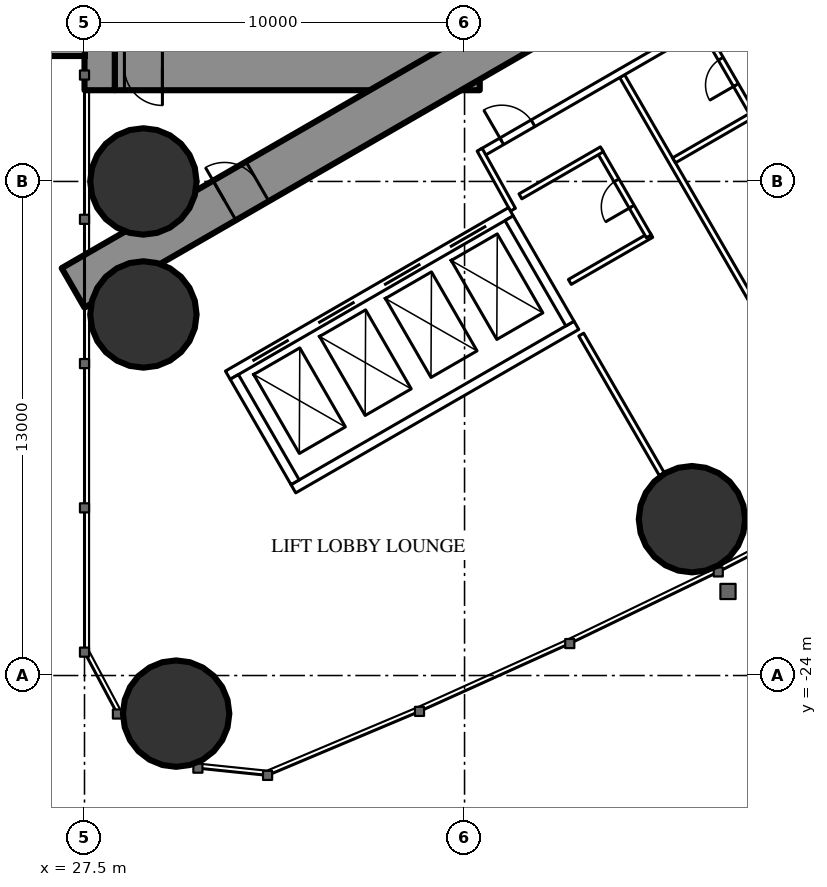
"""IFC4 building model, lengths in metres.
Left out: names, types, materials, properties, quantities, classifications, styles, units other than length and angle.
Written with IfcOpenShell. Run it as: python <this file> out.ifc"""

import sys

from ifc_helpers import new_model, si_unit, direction, frame, frame_2d, origin, origin_2d, place, context, subcontext, project, spatial, rectangle, hollow_circle, extrude, element, fill, save


model = new_model("IFC4")
c1 = context("Model", 3, precision=1e-05, world=origin(), true_north=direction((0.0, 1.0)))
c2 = subcontext(c1, "Body", "Model", "MODEL_VIEW")
j1 = project(units=[si_unit("LENGTHUNIT", "METRE"), si_unit("PLANEANGLEUNIT", "RADIAN")], contexts=[c1])
p1 = place(None, origin())
s1 = spatial("IfcSite", under=j1, at=p1, CompositionType="ELEMENT")
p2 = place(p1, origin())
s2 = spatial("IfcBuilding", under=s1, at=p2, CompositionType="ELEMENT")
p3 = place(p2, frame((0.0, 0.0, 49.5)))
s3 = spatial("IfcBuildingStorey", under=s2, at=p3, CompositionType="ELEMENT", Elevation=49.5)
for number, where, z_axis, x_axis in (
    (1, (29.911, -25.002, 0.0), (0.0, 0.0, 1.0), (1.0, 0.0, 0.0)),
    (2, (29.05, -11.0, 0.0), (0.0, 0.0, 1.0), (1.0, 0.0, 0.0)),
    (3, (29.05, -14.5, 0.0), (0.0, 0.0, 1.0), (1.0, 0.0, 0.0)),
    (4, (43.484, -19.886, 0.0), (0.0, 0.0, 1.0), (1.0, 0.0, 0.0)),
):
    element("IfcColumn", number, at=place(p3, frame(where, z_axis=z_axis, x_axis=x_axis)), inside=s3, PredefinedType="COLUMN", context=c2, shape_type="SweptSolid", body=[
        extrude(hollow_circle(Radius=1.4, WallThickness=0.12, at=origin_2d()), origin(), (0.0, 0.0, 1.0), 3.5),
    ])
p4 = place(p3, frame((27.9, -8.6, 0.0), z_axis=(0.0, 0.0, 1.0), x_axis=(0.0, 1.0, 0.0)))
e5 = element("IfcWall", 5, at=p4, inside=s3, PredefinedType="SHEAR", context=c2, shape_type="SweptSolid", body=[
    extrude(rectangle(XDim=17.2, YDim=0.8, at=frame_2d((8.6, 0.0))), origin(), (0.0, 0.0, 1.0), 3.5),
])
p5 = place(p4, frame((2.45, 0.0, 0.6)))
e6 = element("IfcOpeningElement", 6, at=p5, cuts=e5, PredefinedType="OPENING", context=c2, shape_type="SweptSolid", body=[
    extrude(rectangle(XDim=0.6, YDim=2.1, at=frame_2d((0.3, 1.05))), frame((0.0, 0.41, 0.0), z_axis=(0.0, -1.0, 0.0), x_axis=(1.0, 0.0, 0.0)), (0.0, 0.0, 1.0), 0.82),
])
p6 = place(p4, frame((14.15, 0.0, 0.6)))
e7 = element("IfcOpeningElement", 7, at=p6, cuts=e5, PredefinedType="OPENING", context=c2, shape_type="SweptSolid", body=[
    extrude(rectangle(XDim=0.6, YDim=2.1, at=frame_2d((0.3, 1.05))), frame((0.0, 0.41, 0.0), z_axis=(0.0, -1.0, 0.0), x_axis=(1.0, 0.0, 0.0)), (0.0, 0.0, 1.0), 0.82),
])
p7 = place(p3, frame((37.3, -8.6, 0.0), z_axis=(0.0, 0.0, 1.0), x_axis=(0.0, 1.0, 0.0)))
e8 = element("IfcWall", 8, at=p7, inside=s3, PredefinedType="SHEAR", context=c2, shape_type="SweptSolid", body=[
    extrude(rectangle(XDim=17.2, YDim=1.2, at=frame_2d((8.6, 0.0))), origin(), (0.0, 0.0, 1.0), 3.5),
])
p8 = place(p7, frame((7.7, 0.0, 0.0)))
e9 = element("IfcOpeningElement", 9, at=p8, cuts=e8, PredefinedType="OPENING", context=c2, shape_type="SweptSolid", body=[
    extrude(rectangle(XDim=1.8, YDim=2.2, at=frame_2d((0.9, 1.1))), frame((0.0, 0.61, 0.0), z_axis=(0.0, -1.0, 0.0), x_axis=(1.0, 0.0, 0.0)), (0.0, 0.0, 1.0), 1.22),
])
p9 = place(p3, frame((28.3, -8.0, 0.0), z_axis=(0.0, 0.0, 1.0), x_axis=(1.0, 0.0, 0.0)))
e10 = element("IfcWall", 10, at=p9, inside=s3, PredefinedType="SHEAR", context=c2, shape_type="SweptSolid", body=[
    extrude(rectangle(XDim=8.4, YDim=1.2, at=frame_2d((4.2, 0.0))), origin(), (0.0, 0.0, 1.0), 3.5),
])
p10 = place(p9, frame((0.25, 0.0, 0.0)))
e11 = element("IfcOpeningElement", 11, at=p10, cuts=e10, PredefinedType="OPENING", context=c2, shape_type="SweptSolid", body=[
    extrude(rectangle(XDim=1.0, YDim=2.2, at=frame_2d((0.5, 1.1))), frame((0.0, 0.61, 0.0), z_axis=(0.0, -1.0, 0.0), x_axis=(1.0, 0.0, 0.0)), (0.0, 0.0, 1.0), 1.22),
])
p11 = place(p3, frame((27.2, -13.8, 0.0), z_axis=(0.0, 0.0, 1.0), x_axis=(0.866027159892, 0.499996958321, 0.0)))
e12 = element("IfcWall", 12, at=p11, inside=s3, PredefinedType="SHEAR", context=c2, shape_type="SweptSolid", body=[
    extrude(rectangle(XDim=27.947, YDim=1.2, at=frame_2d((13.973, 0.0))), origin(), (0.0, 0.0, 1.0), 3.5),
])
p12 = place(p11, frame((4.6, 0.0, 0.0)))
e13 = element("IfcOpeningElement", 13, at=p12, cuts=e12, PredefinedType="OPENING", context=c2, shape_type="SweptSolid", body=[
    extrude(rectangle(XDim=1.0, YDim=2.2, at=frame_2d((0.5, 1.1))), frame((0.0, 0.61, 0.0), z_axis=(0.0, -1.0, 0.0), x_axis=(1.0, 0.0, 0.0)), (0.0, 0.0, 1.0), 1.22),
])
p13 = place(p11, frame((13.395, 0.0, 0.0)))
e14 = element("IfcOpeningElement", 14, at=p13, cuts=e12, PredefinedType="OPENING", context=c2, shape_type="SweptSolid", body=[
    extrude(rectangle(XDim=1.8, YDim=2.2, at=frame_2d((0.9, 1.1))), frame((0.0, 0.61, 0.0), z_axis=(0.0, -1.0, 0.0), x_axis=(1.0, 0.0, 0.0)), (0.0, 0.0, 1.0), 1.22),
])
p14 = place(p3, frame((41.647, -8.23, 0.0), z_axis=(0.0, 0.0, 1.0), x_axis=(0.49998590462, -0.866033541603, 0.0)))
e15 = element("IfcWall", 15, at=p14, inside=s3, PredefinedType="PARTITIONING", context=c2, shape_type="SweptSolid", body=[
    extrude(rectangle(XDim=12.621, YDim=0.15, at=frame_2d((6.311, 0.0))), origin(), (0.0, 0.0, 1.0), 3.25),
])
p15 = place(p3, frame((40.57, -15.03, 0.0), z_axis=(0.0, 0.0, 1.0), x_axis=(0.500012993597, -0.866017901798, 0.0)))
e16 = element("IfcWall", 16, at=p15, inside=s3, PredefinedType="PARTITIONING", context=c2, shape_type="SweptSolid", body=[
    extrude(rectangle(XDim=4.243, YDim=0.15, at=frame_2d((2.122, 0.0))), origin(), (0.0, 0.0, 1.0), 3.25),
])
p16 = place(p3, frame((37.96, -10.243, 0.0), z_axis=(0.0, 0.0, 1.0), x_axis=(0.866026429433, 0.499998223521, 0.0)))
e17 = element("IfcWall", 17, at=p16, inside=s3, PredefinedType="PARTITIONING", context=c2, shape_type="SweptSolid", body=[
    extrude(rectangle(XDim=20.487, YDim=0.2, at=frame_2d((10.243, 0.0))), origin(), (0.0, 0.0, 1.0), 3.25),
])
p17 = place(p16, frame((6.925, 0.0, 0.0)))
e18 = element("IfcOpeningElement", 18, at=p17, cuts=e17, PredefinedType="OPENING", context=c2, shape_type="SweptSolid", body=[
    extrude(rectangle(XDim=0.95, YDim=2.2, at=frame_2d((0.475, 1.1))), frame((0.0, 0.11, 0.0), z_axis=(0.0, -1.0, 0.0), x_axis=(1.0, 0.0, 0.0)), (0.0, 0.0, 1.0), 0.22),
])
p18 = place(p16, frame((11.549, 0.0, 0.0)))
e19 = element("IfcOpeningElement", 19, at=p18, cuts=e17, PredefinedType="OPENING", context=c2, shape_type="SweptSolid", body=[
    extrude(rectangle(XDim=0.95, YDim=2.2, at=frame_2d((0.475, 1.1))), frame((0.0, 0.11, 0.0), z_axis=(0.0, -1.0, 0.0), x_axis=(1.0, 0.0, 0.0)), (0.0, 0.0, 1.0), 0.22),
])
p19 = place(p16, frame((13.249, 0.0, 0.0)))
e20 = element("IfcOpeningElement", 20, at=p19, cuts=e17, PredefinedType="OPENING", context=c2, shape_type="SweptSolid", body=[
    extrude(rectangle(XDim=0.95, YDim=2.2, at=frame_2d((0.475, 1.1))), frame((0.0, 0.11, 0.0), z_axis=(0.0, -1.0, 0.0), x_axis=(1.0, 0.0, 0.0)), (0.0, 0.0, 1.0), 0.22),
])
p20 = place(p16, frame((17.585, 0.0, 0.0)))
e21 = element("IfcOpeningElement", 21, at=p20, cuts=e17, PredefinedType="OPENING", context=c2, shape_type="SweptSolid", body=[
    extrude(rectangle(XDim=0.95, YDim=2.2, at=frame_2d((0.475, 1.1))), frame((0.0, 0.11, 0.0), z_axis=(0.0, -1.0, 0.0), x_axis=(1.0, 0.0, 0.0)), (0.0, 0.0, 1.0), 0.22),
])
p21 = place(p16, frame((0.6, 0.0, 0.0)))
e22 = element("IfcOpeningElement", 22, at=p21, cuts=e17, PredefinedType="OPENING", context=c2, shape_type="SweptSolid", body=[
    extrude(rectangle(XDim=0.95, YDim=2.2, at=frame_2d((0.475, 1.1))), frame((0.0, 0.11, 0.0), z_axis=(0.0, -1.0, 0.0), x_axis=(1.0, 0.0, 0.0)), (0.0, 0.0, 1.0), 0.22),
])
p22 = place(p3, frame((38.773, -11.742, 0.0), z_axis=(0.0, 0.0, 1.0), x_axis=(-0.485528096672, 0.8742210632, 0.0)))
e23 = element("IfcWall", 23, at=p22, inside=s3, PredefinedType="PARTITIONING", context=c2, shape_type="SweptSolid", body=[
    extrude(rectangle(XDim=1.805, YDim=0.15, at=frame_2d((0.903, 0.0))), origin(), (0.0, 0.0, 1.0), 3.25),
])
p23 = place(p3, frame((43.012, -10.444, 0.0), z_axis=(0.0, 0.0, 1.0), x_axis=(0.866031185235, 0.4999899861, 0.0)))
e24 = element("IfcWall", 24, at=p23, inside=s3, PredefinedType="PARTITIONING", context=c2, shape_type="SweptSolid", body=[
    extrude(rectangle(XDim=2.475, YDim=0.15, at=frame_2d((1.238, 0.0))), origin(), (0.0, 0.0, 1.0), 3.25),
])
p24 = place(p3, frame((43.791, -6.993, 0.0), z_axis=(0.0, 0.0, 1.0), x_axis=(0.500047596559, -0.865997922154, 0.0)))
e25 = element("IfcWall", 25, at=p24, inside=s3, PredefinedType="PARTITIONING", context=c2, shape_type="SweptSolid", body=[
    extrude(rectangle(XDim=2.6, YDim=0.15, at=frame_2d((1.3, 0.0))), origin(), (0.0, 0.0, 1.0), 3.25),
])
p25 = place(p24, frame((0.9, 0.0, 0.0)))
e26 = element("IfcOpeningElement", 26, at=p25, cuts=e25, PredefinedType="OPENING", context=c2, shape_type="SweptSolid", body=[
    extrude(rectangle(XDim=0.8, YDim=2.2, at=frame_2d((0.4, 1.1))), frame((0.0, 0.085, 0.0), z_axis=(0.0, -1.0, 0.0), x_axis=(1.0, 0.0, 0.0)), (0.0, 0.0, 1.0), 0.17),
])
p26 = place(p3, frame((40.27, -13.644, 0.0), z_axis=(0.0, 0.0, 1.0), x_axis=(0.866031185235, 0.4999899861, 0.0)))
e27 = element("IfcWall", 27, at=p26, inside=s3, PredefinedType="PARTITIONING", context=c2, shape_type="SweptSolid", body=[
    extrude(rectangle(XDim=2.475, YDim=0.15, at=frame_2d((1.238, 0.0))), origin(), (0.0, 0.0, 1.0), 3.25),
])
p27 = place(p3, frame((41.048, -10.193, 0.0), z_axis=(0.0, 0.0, 1.0), x_axis=(0.500047596559, -0.865997922154, 0.0)))
e28 = element("IfcWall", 28, at=p27, inside=s3, PredefinedType="PARTITIONING", context=c2, shape_type="SweptSolid", body=[
    extrude(rectangle(XDim=2.6, YDim=0.15, at=frame_2d((1.3, 0.0))), origin(), (0.0, 0.0, 1.0), 3.25),
])
p28 = place(p27, frame((0.9, 0.0, 0.0)))
e29 = element("IfcOpeningElement", 29, at=p28, cuts=e28, PredefinedType="OPENING", context=c2, shape_type="SweptSolid", body=[
    extrude(rectangle(XDim=0.8, YDim=2.2, at=frame_2d((0.4, 1.1))), frame((0.0, 0.085, 0.0), z_axis=(0.0, -1.0, 0.0), x_axis=(1.0, 0.0, 0.0)), (0.0, 0.0, 1.0), 0.17),
])
p29 = place(p3, frame((38.97, -11.393, 0.0), z_axis=(0.0, 0.0, 1.0), x_axis=(0.866031185235, 0.4999899861, 0.0)))
e30 = element("IfcWall", 30, at=p29, inside=s3, PredefinedType="PARTITIONING", context=c2, shape_type="SweptSolid", body=[
    extrude(rectangle(XDim=2.475, YDim=0.15, at=frame_2d((1.238, 0.0))), origin(), (0.0, 0.0, 1.0), 3.25),
])
p30 = place(p3, frame((31.271, -16.097, 0.0), z_axis=(0.0, 0.0, 1.0), x_axis=(0.86604045752, 0.499973925258, 0.0)))
e31 = element("IfcWall", 31, at=p30, inside=s3, PredefinedType="PARTITIONING", context=c2, shape_type="SweptSolid", body=[
    extrude(rectangle(XDim=8.6, YDim=0.25, at=frame_2d((4.3, 0.0))), origin(), (0.0, 0.0, 1.0), 3.25),
])
p31 = place(p30, frame((0.75, 0.0, 0.0)))
e32 = element("IfcOpeningElement", 32, at=p31, cuts=e31, PredefinedType="OPENING", context=c2, shape_type="SweptSolid", body=[
    extrude(rectangle(XDim=1.1, YDim=2.2, at=frame_2d((0.55, 1.1))), frame((0.0, 0.135, 0.0), z_axis=(0.0, -1.0, 0.0), x_axis=(1.0, 0.0, 0.0)), (0.0, 0.0, 1.0), 0.27),
])
p32 = place(p30, frame((2.75, 0.0, 0.0)))
e33 = element("IfcOpeningElement", 33, at=p32, cuts=e31, PredefinedType="OPENING", context=c2, shape_type="SweptSolid", body=[
    extrude(rectangle(XDim=1.1, YDim=2.2, at=frame_2d((0.55, 1.1))), frame((0.0, 0.135, 0.0), z_axis=(0.0, -1.0, 0.0), x_axis=(1.0, 0.0, 0.0)), (0.0, 0.0, 1.0), 0.27),
])
p33 = place(p30, frame((4.75, 0.0, 0.0)))
e34 = element("IfcOpeningElement", 34, at=p33, cuts=e31, PredefinedType="OPENING", context=c2, shape_type="SweptSolid", body=[
    extrude(rectangle(XDim=1.1, YDim=2.2, at=frame_2d((0.55, 1.1))), frame((0.0, 0.135, 0.0), z_axis=(0.0, -1.0, 0.0), x_axis=(1.0, 0.0, 0.0)), (0.0, 0.0, 1.0), 0.27),
])
p34 = place(p30, frame((6.75, 0.0, 0.0)))
e35 = element("IfcOpeningElement", 35, at=p34, cuts=e31, PredefinedType="OPENING", context=c2, shape_type="SweptSolid", body=[
    extrude(rectangle(XDim=1.1, YDim=2.2, at=frame_2d((0.55, 1.1))), frame((0.0, 0.135, 0.0), z_axis=(0.0, -1.0, 0.0), x_axis=(1.0, 0.0, 0.0)), (0.0, 0.0, 1.0), 0.27),
])
p35 = place(p3, frame((32.996, -19.086, 0.0), z_axis=(0.0, 0.0, 1.0), x_axis=(0.866028165386, 0.499995216735, 0.0)))
e36 = element("IfcWall", 36, at=p35, inside=s3, PredefinedType="PARTITIONING", context=c2, shape_type="SweptSolid", body=[
    extrude(rectangle(XDim=8.6, YDim=0.25, at=frame_2d((4.3, 0.0))), origin(), (0.0, 0.0, 1.0), 3.25),
])
for number, where, z_axis, x_axis in (
    (37, (31.441, -16.143, 0.0), (0.0, 0.0, 1.0), (0.5, -0.866, 0.0)),
    (38, (38.673, -11.968, 0.0), (0.0, 0.0, 1.0), (0.5, -0.866, 0.0)),
):
    element("IfcWall", number, at=place(p3, frame(where, z_axis=z_axis, x_axis=x_axis)), inside=s3, PredefinedType="PARTITIONING", context=c2, shape_type="SweptSolid", body=[
        extrude(rectangle(XDim=3.201, YDim=0.25, at=frame_2d((1.6, 0.0))), origin(), (0.0, 0.0, 1.0), 3.25),
    ])
p36 = place(p25, origin())
e39 = element("IfcDoor", 39, at=p36, inside=s3, OperationType="SINGLE_SWING_RIGHT", PredefinedType="DOOR", context=c2, shape_type="SweptSolid", body=[
    extrude(rectangle(XDim=0.8, YDim=2.2, at=frame_2d((0.4, 1.1))), frame((0.0, 0.025, 0.0), z_axis=(0.0, -1.0, 0.0), x_axis=(1.0, 0.0, 0.0)), (0.0, 0.0, 1.0), 0.05),
])
fill(e26, e39)
p37 = place(p28, origin())
e40 = element("IfcDoor", 40, at=p37, inside=s3, OperationType="SINGLE_SWING_RIGHT", PredefinedType="DOOR", context=c2, shape_type="SweptSolid", body=[
    extrude(rectangle(XDim=0.8, YDim=2.2, at=frame_2d((0.4, 1.1))), frame((0.0, 0.025, 0.0), z_axis=(0.0, -1.0, 0.0), x_axis=(1.0, 0.0, 0.0)), (0.0, 0.0, 1.0), 0.05),
])
fill(e29, e40)
p38 = place(p21, origin())
e41 = element("IfcDoor", 41, at=p38, inside=s3, OperationType="SINGLE_SWING_LEFT", PredefinedType="DOOR", context=c2, shape_type="SweptSolid", body=[
    extrude(rectangle(XDim=0.95, YDim=2.2, at=frame_2d((0.475, 1.1))), frame((0.0, 0.025, 0.0), z_axis=(0.0, -1.0, 0.0), x_axis=(1.0, 0.0, 0.0)), (0.0, 0.0, 1.0), 0.05),
])
fill(e22, e41)
p39 = place(p12, origin())
e42 = element("IfcDoor", 42, at=p39, inside=s3, OperationType="SINGLE_SWING_LEFT", PredefinedType="DOOR", context=c2, shape_type="SweptSolid", body=[
    extrude(rectangle(XDim=1.0, YDim=2.2, at=frame_2d((0.5, 1.1))), frame((0.0, 0.025, 0.0), z_axis=(0.0, -1.0, 0.0), x_axis=(1.0, 0.0, 0.0)), (0.0, 0.0, 1.0), 0.05),
])
fill(e13, e42)
p40 = place(p10, origin())
e43 = element("IfcDoor", 43, at=p40, inside=s3, OperationType="SINGLE_SWING_RIGHT", PredefinedType="DOOR", context=c2, shape_type="SweptSolid", body=[
    extrude(rectangle(XDim=1.0, YDim=2.2, at=frame_2d((0.5, 1.1))), frame((0.0, 0.025, 0.0), z_axis=(0.0, -1.0, 0.0), x_axis=(1.0, 0.0, 0.0)), (0.0, 0.0, 1.0), 0.05),
])
fill(e11, e43)
p41 = place(p31, origin())
e44 = element("IfcDoor", 44, at=p41, inside=s3, OperationType="DOUBLE_DOOR_SLIDING", PredefinedType="USERDEFINED", context=c2, shape_type="SweptSolid", body=[
    extrude(rectangle(XDim=1.1, YDim=2.2, at=frame_2d((0.55, 1.1))), frame((0.0, 0.025, 0.0), z_axis=(0.0, -1.0, 0.0), x_axis=(1.0, 0.0, 0.0)), (0.0, 0.0, 1.0), 0.05),
])
fill(e32, e44)
p42 = place(p32, origin())
e45 = element("IfcDoor", 45, at=p42, inside=s3, OperationType="DOUBLE_DOOR_SLIDING", PredefinedType="USERDEFINED", context=c2, shape_type="SweptSolid", body=[
    extrude(rectangle(XDim=1.1, YDim=2.2, at=frame_2d((0.55, 1.1))), frame((0.0, 0.025, 0.0), z_axis=(0.0, -1.0, 0.0), x_axis=(1.0, 0.0, 0.0)), (0.0, 0.0, 1.0), 0.05),
])
fill(e33, e45)
p43 = place(p33, origin())
e46 = element("IfcDoor", 46, at=p43, inside=s3, OperationType="DOUBLE_DOOR_SLIDING", PredefinedType="USERDEFINED", context=c2, shape_type="SweptSolid", body=[
    extrude(rectangle(XDim=1.1, YDim=2.2, at=frame_2d((0.55, 1.1))), frame((0.0, 0.025, 0.0), z_axis=(0.0, -1.0, 0.0), x_axis=(1.0, 0.0, 0.0)), (0.0, 0.0, 1.0), 0.05),
])
fill(e34, e46)
p44 = place(p34, origin())
e47 = element("IfcDoor", 47, at=p44, inside=s3, OperationType="DOUBLE_DOOR_SLIDING", PredefinedType="USERDEFINED", context=c2, shape_type="SweptSolid", body=[
    extrude(rectangle(XDim=1.1, YDim=2.2, at=frame_2d((0.55, 1.1))), frame((0.0, 0.025, 0.0), z_axis=(0.0, -1.0, 0.0), x_axis=(1.0, 0.0, 0.0)), (0.0, 0.0, 1.0), 0.05),
])
fill(e35, e47)
save(model, sys.argv[1])
